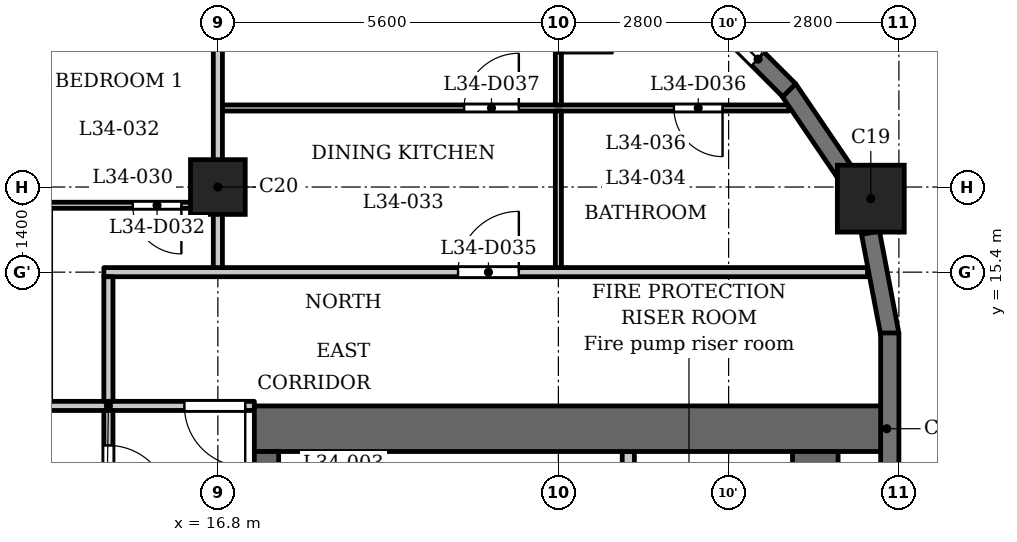
"""IFC4 building model, lengths in metres.
Left out: names, types, materials, properties, quantities, classifications, styles, units other than length and angle.
Written with IfcOpenShell. Run it as: python <this file> out.ifc"""

import sys

from ifc_helpers import new_model, si_unit, direction, frame, frame_2d, origin, origin_2d, place, context, subcontext, project, spatial, rectangle, extrude, element, fill, save


model = new_model("IFC4")
c1 = context("Model", 3, precision=1e-05, world=origin(), true_north=direction((0.0, 1.0)))
c2 = subcontext(c1, "Body", "Model", "MODEL_VIEW")
j1 = project(units=[si_unit("LENGTHUNIT", "METRE"), si_unit("PLANEANGLEUNIT", "RADIAN")], contexts=[c1])
p1 = place(None, origin())
s1 = spatial("IfcSite", under=j1, at=p1, CompositionType="ELEMENT")
p2 = place(p1, origin())
s2 = spatial("IfcBuilding", under=s1, at=p2, CompositionType="ELEMENT")
p3 = place(p2, frame((0.0, 0.0, 136.1)))
s3 = spatial("IfcBuildingStorey", under=s2, at=p3, CompositionType="ELEMENT", Elevation=136.1)
p4 = place(p3, frame((27.538, 16.609, 0.0), z_axis=(0.0, 0.0, 1.0), x_axis=(1.0, 0.0, 0.0)))
e1 = element("IfcColumn", 1, at=p4, inside=s3, PredefinedType="COLUMN", context=c2, shape_type="SweptSolid", body=[
    extrude(rectangle(XDim=1.1, YDim=1.1, at=origin_2d()), origin(), (0.0, 0.0, 1.0), 3.5),
])
p5 = place(p3, frame((16.8, 16.8, 0.0), z_axis=(0.0, 0.0, 1.0), x_axis=(1.0, 0.0, 0.0)))
e2 = element("IfcColumn", 2, at=p5, inside=s3, PredefinedType="COLUMN", context=c2, shape_type="SweptSolid", body=[
    extrude(rectangle(XDim=0.9, YDim=0.9, at=origin_2d()), origin(), (0.0, 0.0, 1.0), 3.5),
])
p6 = place(p3, frame((27.85, 11.75, 0.0), z_axis=(0.0, 0.0, 1.0), x_axis=(0.0, 1.0, 0.0)))
e3 = element("IfcWall", 3, at=p6, inside=s3, PredefinedType="SOLIDWALL", context=c2, shape_type="SweptSolid", body=[
    extrude(rectangle(XDim=2.65, YDim=0.3, at=frame_2d((1.325, 0.0))), origin(), (0.0, 0.0, 1.0), 2.45),
])
p7 = place(p3, frame((27.853, 14.372, 0.0), z_axis=(0.0, 0.0, 1.0), x_axis=(-0.187302784601, 0.982302227871, 0.0)))
e4 = element("IfcWall", 4, at=p7, inside=s3, PredefinedType="SOLIDWALL", context=c2, shape_type="SweptSolid", body=[
    extrude(rectangle(XDim=1.706, YDim=0.3, at=frame_2d((0.853, 0.0))), origin(), (0.0, 0.0, 1.0), 2.45),
])
p8 = place(p3, frame((27.138, 17.002, 0.0), z_axis=(0.0, 0.0, 1.0), x_axis=(-0.562075160946, 0.827086158419, 0.0)))
e5 = element("IfcWall", 5, at=p8, inside=s3, PredefinedType="SOLIDWALL", context=c2, shape_type="SweptSolid", body=[
    extrude(rectangle(XDim=1.706, YDim=0.3, at=frame_2d((0.853, 0.0))), origin(), (0.0, 0.0, 1.0), 2.45),
])
p9 = place(p3, frame((26.197, 18.391, 0.0), z_axis=(0.0, 0.0, 1.0), x_axis=(-0.707060717099, 0.707152842274, 0.0)))
e6 = element("IfcWall", 6, at=p9, inside=s3, PredefinedType="SOLIDWALL", context=c2, shape_type="SweptSolid", body=[
    extrude(rectangle(XDim=2.65, YDim=0.3, at=frame_2d((1.325, 0.0))), origin(), (0.0, 0.0, 1.0), 2.45),
])
p10 = place(p9, frame((0.725, 0.0, 0.6)))
e7 = element("IfcOpeningElement", 7, at=p10, cuts=e6, PredefinedType="OPENING", context=c2, shape_type="SweptSolid", body=[
    extrude(rectangle(XDim=1.2, YDim=1.55, at=frame_2d((0.6, 0.775))), frame((0.0, 0.16, 0.0), z_axis=(0.0, -1.0, 0.0), x_axis=(1.0, 0.0, 0.0)), (0.0, 0.0, 1.0), 0.32),
])
p11 = place(p3, frame((17.4, 12.825, 0.0), z_axis=(0.0, 0.0, 1.0), x_axis=(1.0, 0.0, 0.0)))
e8 = element("IfcWall", 8, at=p11, inside=s3, PredefinedType="SHEAR", context=c2, shape_type="SweptSolid", body=[
    extrude(rectangle(XDim=10.4, YDim=0.75, at=frame_2d((5.2, 0.0))), origin(), (0.0, 0.0, 1.0), 3.2),
])
p12 = place(p3, frame((17.6, -12.45, 0.0), z_axis=(0.0, 0.0, 1.0), x_axis=(0.0, 1.0, 0.0)))
e9 = element("IfcWall", 9, at=p12, inside=s3, PredefinedType="SHEAR", context=c2, shape_type="SweptSolid", body=[
    extrude(rectangle(XDim=24.9, YDim=0.4, at=frame_2d((12.45, 0.0))), origin(), (0.0, 0.0, 1.0), 3.2),
])
p13 = place(p12, frame((8.65, 0.0, 0.0)))
e10 = element("IfcOpeningElement", 10, at=p13, cuts=e9, PredefinedType="OPENING", context=c2, shape_type="SweptSolid", body=[
    extrude(rectangle(XDim=0.9, YDim=2.1, at=frame_2d((0.45, 1.05))), frame((0.0, 0.21, 0.0), z_axis=(0.0, -1.0, 0.0), x_axis=(1.0, 0.0, 0.0)), (0.0, 0.0, 1.0), 0.42),
])
p14 = place(p12, frame((15.6, 0.0, 0.0)))
e11 = element("IfcOpeningElement", 11, at=p14, cuts=e9, PredefinedType="OPENING", context=c2, shape_type="SweptSolid", body=[
    extrude(rectangle(XDim=1.1, YDim=2.1, at=frame_2d((0.55, 1.05))), frame((0.0, 0.21, 0.0), z_axis=(0.0, -1.0, 0.0), x_axis=(1.0, 0.0, 0.0)), (0.0, 0.0, 1.0), 0.42),
])
p15 = place(p12, frame((18.0, 0.0, 0.0)))
e12 = element("IfcOpeningElement", 12, at=p15, cuts=e9, PredefinedType="OPENING", context=c2, shape_type="SweptSolid", body=[
    extrude(rectangle(XDim=1.1, YDim=2.1, at=frame_2d((0.55, 1.05))), frame((0.0, 0.21, 0.0), z_axis=(0.0, -1.0, 0.0), x_axis=(1.0, 0.0, 0.0)), (0.0, 0.0, 1.0), 0.42),
])
p16 = place(p12, frame((23.025, 0.0, 0.0)))
e13 = element("IfcOpeningElement", 13, at=p16, cuts=e9, PredefinedType="OPENING", context=c2, shape_type="SweptSolid", body=[
    extrude(rectangle(XDim=1.1, YDim=2.1, at=frame_2d((0.55, 1.05))), frame((0.0, 0.21, 0.0), z_axis=(0.0, -1.0, 0.0), x_axis=(1.0, 0.0, 0.0)), (0.0, 0.0, 1.0), 0.42),
])
p17 = place(p12, frame((0.775, 0.0, 0.0)))
e14 = element("IfcOpeningElement", 14, at=p17, cuts=e9, PredefinedType="OPENING", context=c2, shape_type="SweptSolid", body=[
    extrude(rectangle(XDim=1.1, YDim=2.1, at=frame_2d((0.55, 1.05))), frame((0.0, 0.21, 0.0), z_axis=(0.0, -1.0, 0.0), x_axis=(1.0, 0.0, 0.0)), (0.0, 0.0, 1.0), 0.42),
])
p18 = place(p12, frame((12.925, 0.0, 0.0)))
e15 = element("IfcOpeningElement", 15, at=p18, cuts=e9, PredefinedType="OPENING", context=c2, shape_type="SweptSolid", body=[
    extrude(rectangle(XDim=1.8, YDim=2.1, at=frame_2d((0.9, 1.05))), frame((0.0, 0.21, 0.0), z_axis=(0.0, -1.0, 0.0), x_axis=(1.0, 0.0, 0.0)), (0.0, 0.0, 1.0), 0.42),
])
p19 = place(p3, frame((26.625, -12.45, 0.0), z_axis=(0.0, 0.0, 1.0), x_axis=(0.0, 1.0, 0.0)))
e16 = element("IfcWall", 16, at=p19, inside=s3, PredefinedType="SHEAR", context=c2, shape_type="SweptSolid", body=[
    extrude(rectangle(XDim=24.9, YDim=0.75, at=frame_2d((12.45, 0.0))), origin(), (0.0, 0.0, 1.0), 3.2),
])
p20 = place(p3, frame((23.55, 9.8, 0.0), z_axis=(0.0, 0.0, 1.0), x_axis=(0.0, 1.0, 0.0)))
e17 = element("IfcWall", 17, at=p20, inside=s3, PredefinedType="PARTITIONING", context=c2, shape_type="SweptSolid", body=[
    extrude(rectangle(XDim=2.65, YDim=0.2, at=frame_2d((1.325, 0.0))), origin(), (0.0, 0.0, 1.0), 3.2),
])
p21 = place(p20, frame((0.875, 0.0, 0.0)))
e18 = element("IfcOpeningElement", 18, at=p21, cuts=e17, PredefinedType="OPENING", context=c2, shape_type="SweptSolid", body=[
    extrude(rectangle(XDim=0.9, YDim=2.1, at=frame_2d((0.45, 1.05))), frame((0.0, 0.11, 0.0), z_axis=(0.0, -1.0, 0.0), x_axis=(1.0, 0.0, 0.0)), (0.0, 0.0, 1.0), 0.22),
])
p22 = place(p3, frame((-17.4, 13.2, 0.0), z_axis=(0.0, 0.0, 1.0), x_axis=(1.0, 0.0, 0.0)))
e19 = element("IfcWall", 19, at=p22, inside=s3, PredefinedType="PARTITIONING", context=c2, shape_type="SweptSolid", body=[
    extrude(rectangle(XDim=34.8, YDim=0.15, at=frame_2d((17.4, 0.0))), origin(), (0.0, 0.0, 1.0), 3.2),
])
p23 = place(p22, frame((0.25, 0.0, 0.0)))
e20 = element("IfcOpeningElement", 20, at=p23, cuts=e19, PredefinedType="OPENING", context=c2, shape_type="SweptSolid", body=[
    extrude(rectangle(XDim=1.0, YDim=2.1, at=frame_2d((0.5, 1.05))), frame((0.0, 0.085, 0.0), z_axis=(0.0, -1.0, 0.0), x_axis=(1.0, 0.0, 0.0)), (0.0, 0.0, 1.0), 0.17),
])
p24 = place(p22, frame((33.65, 0.0, 0.0)))
e21 = element("IfcOpeningElement", 21, at=p24, cuts=e19, PredefinedType="OPENING", context=c2, shape_type="SweptSolid", body=[
    extrude(rectangle(XDim=1.0, YDim=2.1, at=frame_2d((0.5, 1.05))), frame((0.0, 0.085, 0.0), z_axis=(0.0, -1.0, 0.0), x_axis=(1.0, 0.0, 0.0)), (0.0, 0.0, 1.0), 0.17),
])
p25 = place(p22, frame((15.75, 0.0, 0.0)))
e22 = element("IfcOpeningElement", 22, at=p25, cuts=e19, PredefinedType="OPENING", context=c2, shape_type="SweptSolid", body=[
    extrude(rectangle(XDim=1.0, YDim=2.1, at=frame_2d((0.5, 1.05))), frame((0.0, 0.085, 0.0), z_axis=(0.0, -1.0, 0.0), x_axis=(1.0, 0.0, 0.0)), (0.0, 0.0, 1.0), 0.17),
])
p26 = place(p22, frame((19.35, 0.0, 0.0)))
e23 = element("IfcOpeningElement", 23, at=p26, cuts=e19, PredefinedType="OPENING", context=c2, shape_type="SweptSolid", body=[
    extrude(rectangle(XDim=1.0, YDim=2.1, at=frame_2d((0.5, 1.05))), frame((0.0, 0.085, 0.0), z_axis=(0.0, -1.0, 0.0), x_axis=(1.0, 0.0, 0.0)), (0.0, 0.0, 1.0), 0.17),
])
p27 = place(p22, frame((26.95, 0.0, 0.0)))
e24 = element("IfcOpeningElement", 24, at=p27, cuts=e19, PredefinedType="OPENING", context=c2, shape_type="SweptSolid", body=[
    extrude(rectangle(XDim=1.0, YDim=2.1, at=frame_2d((0.5, 1.05))), frame((0.0, 0.085, 0.0), z_axis=(0.0, -1.0, 0.0), x_axis=(1.0, 0.0, 0.0)), (0.0, 0.0, 1.0), 0.17),
])
p28 = place(p22, frame((29.75, 0.0, 0.0)))
e25 = element("IfcOpeningElement", 25, at=p28, cuts=e19, PredefinedType="OPENING", context=c2, shape_type="SweptSolid", body=[
    extrude(rectangle(XDim=1.0, YDim=2.1, at=frame_2d((0.5, 1.05))), frame((0.0, 0.085, 0.0), z_axis=(0.0, -1.0, 0.0), x_axis=(1.0, 0.0, 0.0)), (0.0, 0.0, 1.0), 0.17),
])
p29 = place(p3, frame((14.925, 15.4, 0.0), z_axis=(0.0, 0.0, 1.0), x_axis=(1.0, 0.0, 0.0)))
e26 = element("IfcWall", 26, at=p29, inside=s3, PredefinedType="PARTITIONING", context=c2, shape_type="SweptSolid", body=[
    extrude(rectangle(XDim=12.559, YDim=0.15, at=frame_2d((6.279, 0.0))), origin(), (0.0, 0.0, 1.0), 3.2),
])
p30 = place(p29, frame((5.825, 0.0, 0.0)))
e27 = element("IfcOpeningElement", 27, at=p30, cuts=e26, PredefinedType="OPENING", context=c2, shape_type="SweptSolid", body=[
    extrude(rectangle(XDim=1.0, YDim=2.1, at=frame_2d((0.5, 1.05))), frame((0.0, 0.085, 0.0), z_axis=(0.0, -1.0, 0.0), x_axis=(1.0, 0.0, 0.0)), (0.0, 0.0, 1.0), 0.17),
])
p31 = place(p3, frame((-16.725, 16.5, 0.0), z_axis=(0.0, 0.0, 1.0), x_axis=(1.0, 0.0, 0.0)))
e28 = element("IfcWall", 28, at=p31, inside=s3, PredefinedType="PARTITIONING", context=c2, shape_type="SweptSolid", body=[
    extrude(rectangle(XDim=33.45, YDim=0.1, at=frame_2d((16.725, 0.0))), origin(), (0.0, 0.0, 1.0), 3.2),
])
p32 = place(p31, frame((9.675, 0.0, 0.0)))
e29 = element("IfcOpeningElement", 29, at=p32, cuts=e28, PredefinedType="OPENING", context=c2, shape_type="SweptSolid", body=[
    extrude(rectangle(XDim=0.8, YDim=2.1, at=frame_2d((0.4, 1.05))), frame((0.0, 0.06, 0.0), z_axis=(0.0, -1.0, 0.0), x_axis=(1.0, 0.0, 0.0)), (0.0, 0.0, 1.0), 0.12),
])
p33 = place(p31, frame((3.975, 0.0, 0.0)))
e30 = element("IfcOpeningElement", 30, at=p33, cuts=e28, PredefinedType="OPENING", context=c2, shape_type="SweptSolid", body=[
    extrude(rectangle(XDim=0.9, YDim=2.1, at=frame_2d((0.45, 1.05))), frame((0.0, 0.06, 0.0), z_axis=(0.0, -1.0, 0.0), x_axis=(1.0, 0.0, 0.0)), (0.0, 0.0, 1.0), 0.12),
])
p34 = place(p31, frame((12.025, 0.0, 0.0)))
e31 = element("IfcOpeningElement", 31, at=p34, cuts=e28, PredefinedType="OPENING", context=c2, shape_type="SweptSolid", body=[
    extrude(rectangle(XDim=0.8, YDim=2.1, at=frame_2d((0.4, 1.05))), frame((0.0, 0.06, 0.0), z_axis=(0.0, -1.0, 0.0), x_axis=(1.0, 0.0, 0.0)), (0.0, 0.0, 1.0), 0.12),
])
p35 = place(p31, frame((15.175, 0.0, 0.0)))
e32 = element("IfcOpeningElement", 32, at=p35, cuts=e28, PredefinedType="OPENING", context=c2, shape_type="SweptSolid", body=[
    extrude(rectangle(XDim=0.9, YDim=2.1, at=frame_2d((0.45, 1.05))), frame((0.0, 0.06, 0.0), z_axis=(0.0, -1.0, 0.0), x_axis=(1.0, 0.0, 0.0)), (0.0, 0.0, 1.0), 0.12),
])
p36 = place(p31, frame((20.975, 0.0, 0.0)))
e33 = element("IfcOpeningElement", 33, at=p36, cuts=e28, PredefinedType="OPENING", context=c2, shape_type="SweptSolid", body=[
    extrude(rectangle(XDim=0.8, YDim=2.1, at=frame_2d((0.4, 1.05))), frame((0.0, 0.06, 0.0), z_axis=(0.0, -1.0, 0.0), x_axis=(1.0, 0.0, 0.0)), (0.0, 0.0, 1.0), 0.12),
])
p37 = place(p31, frame((18.175, 0.0, 0.0)))
e34 = element("IfcOpeningElement", 34, at=p37, cuts=e28, PredefinedType="OPENING", context=c2, shape_type="SweptSolid", body=[
    extrude(rectangle(XDim=0.9, YDim=2.1, at=frame_2d((0.45, 1.05))), frame((0.0, 0.06, 0.0), z_axis=(0.0, -1.0, 0.0), x_axis=(1.0, 0.0, 0.0)), (0.0, 0.0, 1.0), 0.12),
])
p38 = place(p31, frame((23.725, 0.0, 0.0)))
e35 = element("IfcOpeningElement", 35, at=p38, cuts=e28, PredefinedType="OPENING", context=c2, shape_type="SweptSolid", body=[
    extrude(rectangle(XDim=0.8, YDim=2.1, at=frame_2d((0.4, 1.05))), frame((0.0, 0.06, 0.0), z_axis=(0.0, -1.0, 0.0), x_axis=(1.0, 0.0, 0.0)), (0.0, 0.0, 1.0), 0.12),
])
p39 = place(p31, frame((26.125, 0.0, 0.0)))
e36 = element("IfcOpeningElement", 36, at=p39, cuts=e28, PredefinedType="OPENING", context=c2, shape_type="SweptSolid", body=[
    extrude(rectangle(XDim=0.9, YDim=2.1, at=frame_2d((0.45, 1.05))), frame((0.0, 0.06, 0.0), z_axis=(0.0, -1.0, 0.0), x_axis=(1.0, 0.0, 0.0)), (0.0, 0.0, 1.0), 0.12),
])
p40 = place(p31, frame((32.125, 0.0, 0.0)))
e37 = element("IfcOpeningElement", 37, at=p40, cuts=e28, PredefinedType="OPENING", context=c2, shape_type="SweptSolid", body=[
    extrude(rectangle(XDim=0.8, YDim=2.1, at=frame_2d((0.4, 1.05))), frame((0.0, 0.06, 0.0), z_axis=(0.0, -1.0, 0.0), x_axis=(1.0, 0.0, 0.0)), (0.0, 0.0, 1.0), 0.12),
])
p41 = place(p31, frame((28.975, 0.0, 0.0)))
e38 = element("IfcOpeningElement", 38, at=p41, cuts=e28, PredefinedType="OPENING", context=c2, shape_type="SweptSolid", body=[
    extrude(rectangle(XDim=0.9, YDim=2.1, at=frame_2d((0.45, 1.05))), frame((0.0, 0.06, 0.0), z_axis=(0.0, -1.0, 0.0), x_axis=(1.0, 0.0, 0.0)), (0.0, 0.0, 1.0), 0.12),
])
p42 = place(p3, frame((16.875, 18.1, 0.0), z_axis=(0.0, 0.0, 1.0), x_axis=(1.0, 0.0, 0.0)))
e39 = element("IfcWall", 39, at=p42, inside=s3, PredefinedType="PARTITIONING", context=c2, shape_type="SweptSolid", body=[
    extrude(rectangle(XDim=9.315, YDim=0.1, at=frame_2d((4.658, 0.0))), origin(), (0.0, 0.0, 1.0), 3.2),
])
p43 = place(p42, frame((7.425, 0.0, 0.0)))
e40 = element("IfcOpeningElement", 40, at=p43, cuts=e39, PredefinedType="OPENING", context=c2, shape_type="SweptSolid", body=[
    extrude(rectangle(XDim=0.8, YDim=2.1, at=frame_2d((0.4, 1.05))), frame((0.0, 0.06, 0.0), z_axis=(0.0, -1.0, 0.0), x_axis=(1.0, 0.0, 0.0)), (0.0, 0.0, 1.0), 0.12),
])
p44 = place(p42, frame((3.975, 0.0, 0.0)))
e41 = element("IfcOpeningElement", 41, at=p44, cuts=e39, PredefinedType="OPENING", context=c2, shape_type="SweptSolid", body=[
    extrude(rectangle(XDim=0.9, YDim=2.1, at=frame_2d((0.45, 1.05))), frame((0.0, 0.06, 0.0), z_axis=(0.0, -1.0, 0.0), x_axis=(1.0, 0.0, 0.0)), (0.0, 0.0, 1.0), 0.12),
])
p45 = place(p3, frame((15.0, 6.769, 0.0), z_axis=(0.0, 0.0, 1.0), x_axis=(0.0, 1.0, 0.0)))
e42 = element("IfcWall", 42, at=p45, inside=s3, PredefinedType="PARTITIONING", context=c2, shape_type="SweptSolid", body=[
    extrude(rectangle(XDim=6.356, YDim=0.15, at=frame_2d((3.178, 0.0))), origin(), (0.0, 0.0, 1.0), 3.2),
])
p46 = place(p45, frame((4.781, 0.0, 0.0)))
e43 = element("IfcOpeningElement", 43, at=p46, cuts=e42, PredefinedType="OPENING", context=c2, shape_type="SweptSolid", body=[
    extrude(rectangle(XDim=1.0, YDim=2.1, at=frame_2d((0.5, 1.05))), frame((0.0, 0.085, 0.0), z_axis=(0.0, -1.0, 0.0), x_axis=(1.0, 0.0, 0.0)), (0.0, 0.0, 1.0), 0.17),
])
p47 = place(p3, frame((15.0, 13.275, 0.0), z_axis=(0.0, 0.0, 1.0), x_axis=(0.0, 1.0, 0.0)))
e44 = element("IfcWall", 44, at=p47, inside=s3, PredefinedType="PARTITIONING", context=c2, shape_type="SweptSolid", body=[
    extrude(rectangle(XDim=2.05, YDim=0.15, at=frame_2d((1.025, 0.0))), origin(), (0.0, 0.0, 1.0), 3.2),
])
p48 = place(p3, frame((16.8, 15.475, 0.0), z_axis=(0.0, 0.0, 1.0), x_axis=(0.0, 1.0, 0.0)))
e45 = element("IfcWall", 45, at=p48, inside=s3, PredefinedType="PARTITIONING", context=c2, shape_type="SweptSolid", body=[
    extrude(rectangle(XDim=7.455, YDim=0.15, at=frame_2d((3.728, 0.0))), origin(), (0.0, 0.0, 1.0), 3.2),
])
p49 = place(p3, frame((22.4, 15.475, 0.0), z_axis=(0.0, 0.0, 1.0), x_axis=(0.0, 1.0, 0.0)))
e46 = element("IfcWall", 46, at=p49, inside=s3, PredefinedType="PARTITIONING", context=c2, shape_type="SweptSolid", body=[
    extrude(rectangle(XDim=2.575, YDim=0.1, at=frame_2d((1.288, 0.0))), origin(), (0.0, 0.0, 1.0), 3.2),
])
p50 = place(p3, frame((22.4, 18.15, 0.0), z_axis=(0.0, 0.0, 1.0), x_axis=(0.0, 1.0, 0.0)))
e47 = element("IfcWall", 47, at=p50, inside=s3, PredefinedType="PARTITIONING", context=c2, shape_type="SweptSolid", body=[
    extrude(rectangle(XDim=3.57, YDim=0.1, at=frame_2d((1.785, 0.0))), origin(), (0.0, 0.0, 1.0), 3.2),
])
p51 = place(p50, frame((0.85, 0.0, 0.0)))
e48 = element("IfcOpeningElement", 48, at=p51, cuts=e47, PredefinedType="OPENING", context=c2, shape_type="SweptSolid", body=[
    extrude(rectangle(XDim=0.9, YDim=2.1, at=frame_2d((0.45, 1.05))), frame((0.0, 0.06, 0.0), z_axis=(0.0, -1.0, 0.0), x_axis=(1.0, 0.0, 0.0)), (0.0, 0.0, 1.0), 0.12),
])
p52 = place(p46, origin())
e49 = element("IfcDoor", 49, at=p52, inside=s3, OperationType="SINGLE_SWING_LEFT", PredefinedType="DOOR", context=c2, shape_type="SweptSolid", body=[
    extrude(rectangle(XDim=1.0, YDim=2.1, at=frame_2d((0.5, 1.05))), frame((0.0, 0.025, 0.0), z_axis=(0.0, -1.0, 0.0), x_axis=(1.0, 0.0, 0.0)), (0.0, 0.0, 1.0), 0.05),
])
fill(e43, e49)
p53 = place(p24, origin())
e50 = element("IfcDoor", 50, at=p53, inside=s3, OperationType="SINGLE_SWING_RIGHT", PredefinedType="DOOR", context=c2, shape_type="SweptSolid", body=[
    extrude(rectangle(XDim=1.0, YDim=2.1, at=frame_2d((0.5, 1.05))), frame((0.0, 0.025, 0.0), z_axis=(0.0, -1.0, 0.0), x_axis=(1.0, 0.0, 0.0)), (0.0, 0.0, 1.0), 0.05),
])
fill(e21, e50)
p54 = place(p40, origin())
e51 = element("IfcDoor", 51, at=p54, inside=s3, OperationType="SINGLE_SWING_RIGHT", PredefinedType="DOOR", context=c2, shape_type="SweptSolid", body=[
    extrude(rectangle(XDim=0.8, YDim=2.1, at=frame_2d((0.4, 1.05))), frame((0.0, 0.025, 0.0), z_axis=(0.0, -1.0, 0.0), x_axis=(1.0, 0.0, 0.0)), (0.0, 0.0, 1.0), 0.05),
])
fill(e37, e51)
p55 = place(p30, origin())
e52 = element("IfcDoor", 52, at=p55, inside=s3, OperationType="SINGLE_SWING_LEFT", PredefinedType="DOOR", context=c2, shape_type="SweptSolid", body=[
    extrude(rectangle(XDim=1.0, YDim=2.1, at=frame_2d((0.5, 1.05))), frame((0.0, 0.025, 0.0), z_axis=(0.0, -1.0, 0.0), x_axis=(1.0, 0.0, 0.0)), (0.0, 0.0, 1.0), 0.05),
])
fill(e27, e52)
p56 = place(p43, origin())
e53 = element("IfcDoor", 53, at=p56, inside=s3, OperationType="SINGLE_SWING_RIGHT", PredefinedType="DOOR", context=c2, shape_type="SweptSolid", body=[
    extrude(rectangle(XDim=0.8, YDim=2.1, at=frame_2d((0.4, 1.05))), frame((0.0, 0.025, 0.0), z_axis=(0.0, -1.0, 0.0), x_axis=(1.0, 0.0, 0.0)), (0.0, 0.0, 1.0), 0.05),
])
fill(e40, e53)
p57 = place(p44, origin())
e54 = element("IfcDoor", 54, at=p57, inside=s3, OperationType="SINGLE_SWING_LEFT", PredefinedType="DOOR", context=c2, shape_type="SweptSolid", body=[
    extrude(rectangle(XDim=0.9, YDim=2.1, at=frame_2d((0.45, 1.05))), frame((0.0, 0.025, 0.0), z_axis=(0.0, -1.0, 0.0), x_axis=(1.0, 0.0, 0.0)), (0.0, 0.0, 1.0), 0.05),
])
fill(e41, e54)
p58 = place(p51, origin())
e55 = element("IfcDoor", 55, at=p58, inside=s3, OperationType="SINGLE_SWING_LEFT", PredefinedType="DOOR", context=c2, shape_type="SweptSolid", body=[
    extrude(rectangle(XDim=0.9, YDim=2.1, at=frame_2d((0.45, 1.05))), frame((0.0, 0.025, 0.0), z_axis=(0.0, -1.0, 0.0), x_axis=(1.0, 0.0, 0.0)), (0.0, 0.0, 1.0), 0.05),
])
fill(e48, e55)
p59 = place(p10, origin())
e56 = element("IfcWindow", 56, at=p59, inside=s3, PartitioningType="SINGLE_PANEL", PredefinedType="WINDOW", context=c2, shape_type="SweptSolid", body=[
    extrude(rectangle(XDim=1.2, YDim=1.55, at=frame_2d((0.6, 0.775))), frame((0.0, 0.03, 0.0), z_axis=(0.0, -1.0, 0.0), x_axis=(1.0, 0.0, 0.0)), (0.0, 0.0, 1.0), 0.06),
])
fill(e7, e56)
save(model, sys.argv[1])
